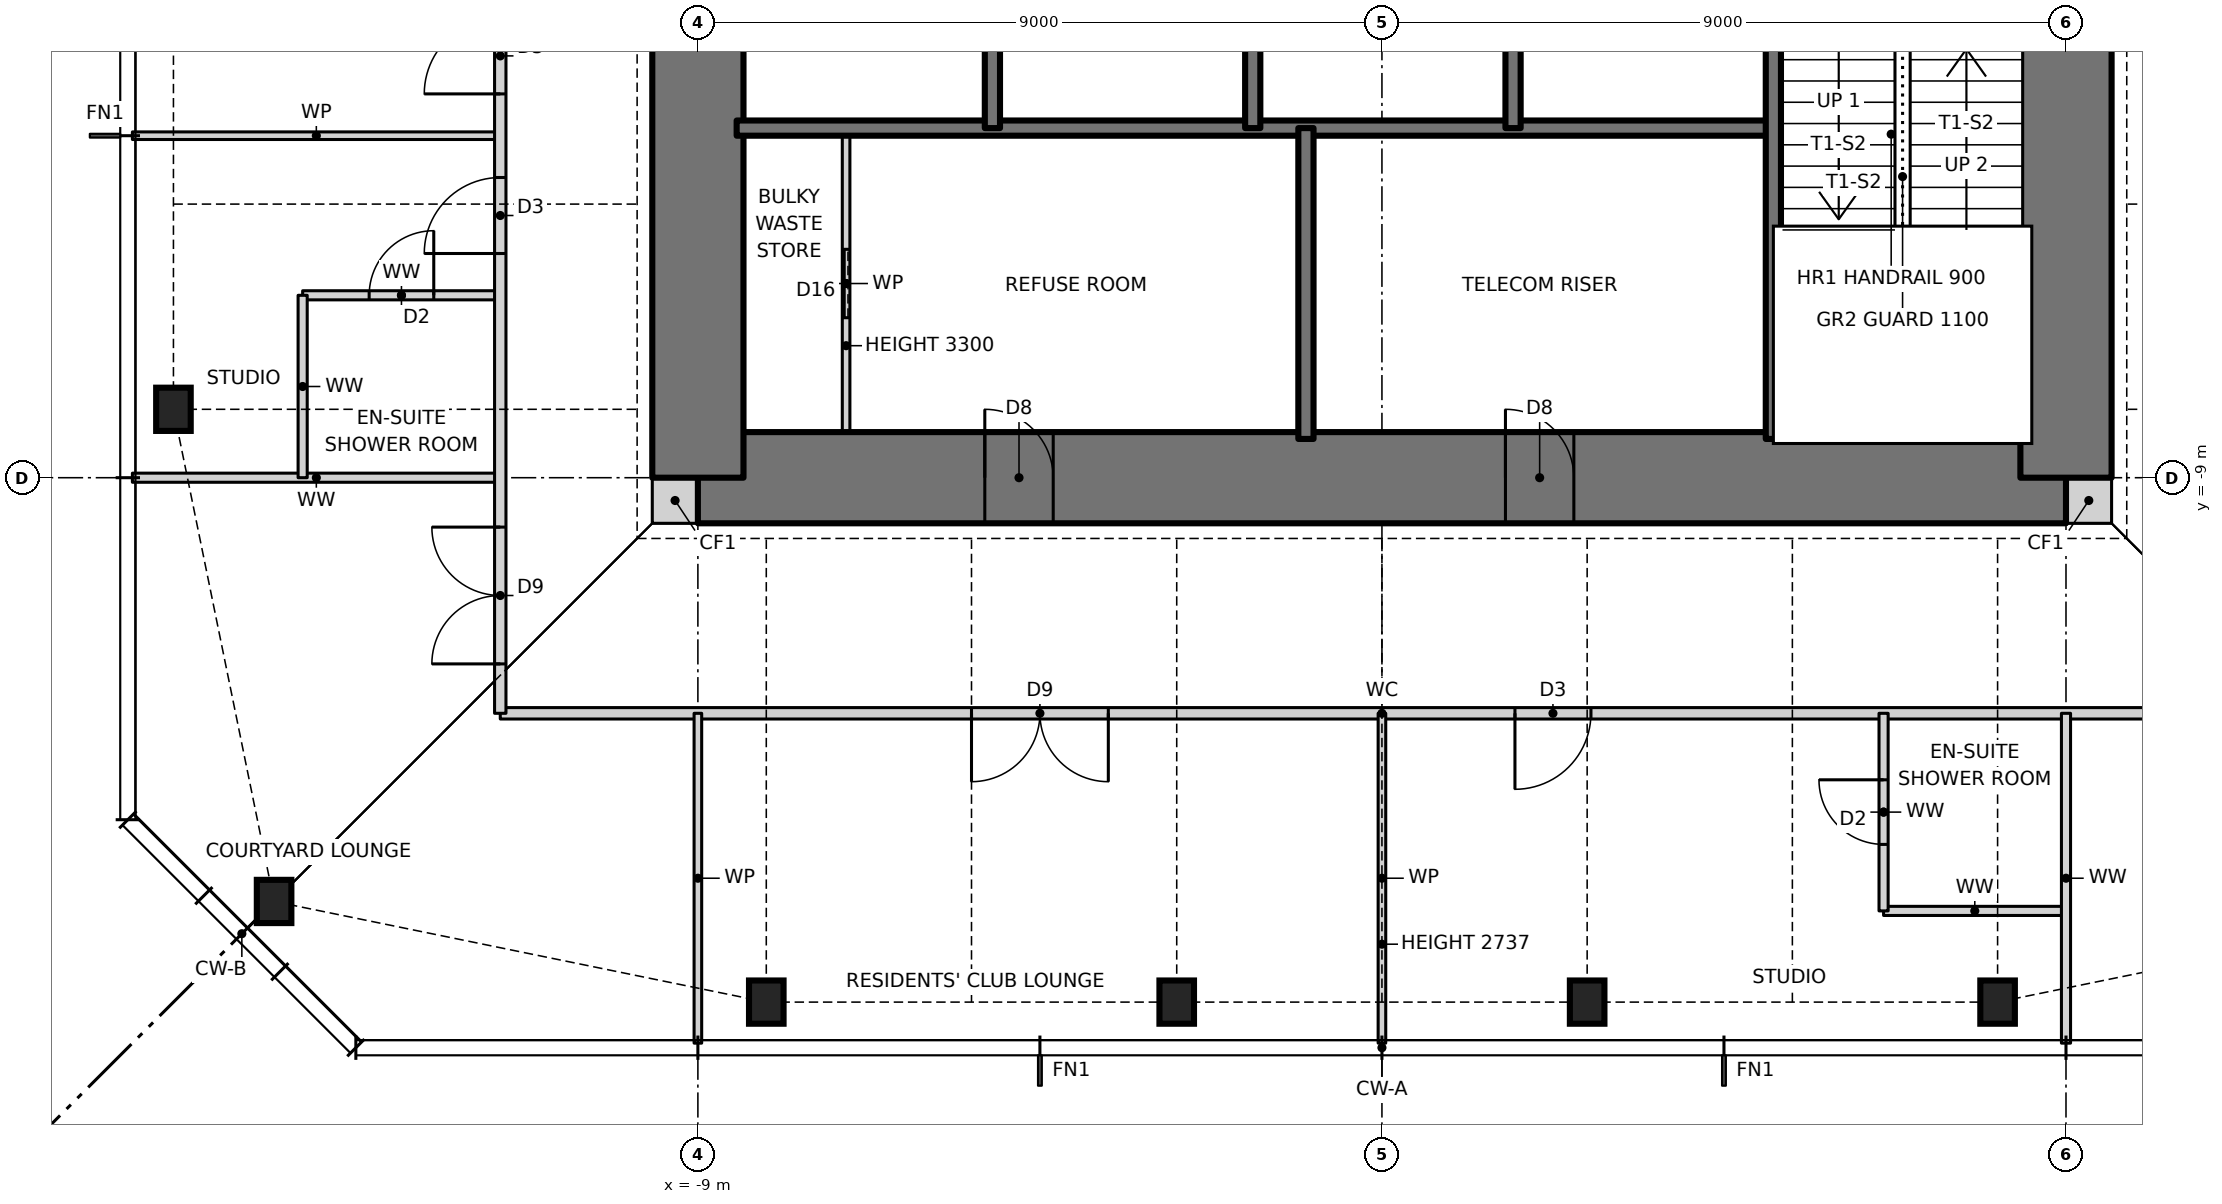
"""IFC4 building model, lengths in metres.
Left out: names, types, materials, properties, quantities, classifications, styles, units other than length and angle.
Written with IfcOpenShell. Run it as: python <this file> out.ifc"""

import sys

from ifc_helpers import new_model, si_unit, direction, frame, frame_2d, origin, origin_2d, place, context, subcontext, project, spatial, rectangle, i_section, extrude, element, fill, save


model = new_model("IFC4")
c1 = context("Model", 3, precision=1e-05, world=origin(), true_north=direction((0.0, 1.0)))
c2 = subcontext(c1, "Body", "Model", "MODEL_VIEW")
j1 = project(units=[si_unit("LENGTHUNIT", "METRE"), si_unit("PLANEANGLEUNIT", "RADIAN")], contexts=[c1])
p1 = place(None, origin())
s1 = spatial("IfcSite", under=j1, at=p1, CompositionType="ELEMENT")
p2 = place(p1, origin())
s2 = spatial("IfcBuilding", under=s1, at=p2, CompositionType="ELEMENT")
p3 = place(p2, frame((0.0, 0.0, 260.5)))
s3 = spatial("IfcBuildingStorey", under=s2, at=p3, CompositionType="ELEMENT", Elevation=260.5)
for number, where, z_axis, x_axis in (
    (1, (-14.576, -14.576, 0.0), (0.0, 0.0, 1.0), (1.0, 0.0, 0.0)),
    (2, (-8.1, -15.9, 0.0), (0.0, 0.0, 1.0), (1.0, 0.0, 0.0)),
    (3, (-2.7, -15.9, 0.0), (0.0, 0.0, 1.0), (1.0, 0.0, 0.0)),
    (4, (2.7, -15.9, 0.0), (0.0, 0.0, 1.0), (1.0, 0.0, 0.0)),
    (5, (8.1, -15.9, 0.0), (0.0, 0.0, 1.0), (1.0, 0.0, 0.0)),
    (6, (-15.9, -8.1, 0.0), (0.0, 0.0, 1.0), (1.0, 0.0, 0.0)),
):
    element("IfcColumn", number, at=place(p3, frame(where, z_axis=z_axis, x_axis=x_axis)), inside=s3, PredefinedType="COLUMN", context=c2, shape_type="SweptSolid", body=[
        extrude(i_section(OverallWidth=0.455, OverallDepth=0.569, WebThickness=0.078, FlangeThickness=0.125, at=origin_2d()), origin(), (0.0, 0.0, 1.0), 3.5),
    ])
for number, where, z_axis, x_axis in (
    (7, (-9.6, -9.3, 0.0), (0.0, 0.0, 1.0), (1.0, 0.0, 0.0)),
    (8, (9.0, -9.3, 0.0), (0.0, 0.0, 1.0), (1.0, 0.0, 0.0)),
):
    element("IfcWall", number, at=place(p3, frame(where, z_axis=z_axis, x_axis=x_axis)), inside=s3, PredefinedType="SOLIDWALL", context=c2, shape_type="SweptSolid", body=[
        extrude(rectangle(XDim=0.6, YDim=0.6, at=frame_2d((0.3, 0.0))), origin(), (0.0, 0.0, 1.0), 3.5),
    ])
p4 = place(p3, frame((-9.0, -9.0, 0.0), z_axis=(0.0, 0.0, 1.0), x_axis=(1.0, 0.0, 0.0)))
e9 = element("IfcWall", 9, at=p4, inside=s3, PredefinedType="SHEAR", context=c2, shape_type="SweptSolid", body=[
    extrude(rectangle(XDim=18.0, YDim=1.2, at=frame_2d((9.0, 0.0))), origin(), (0.0, 0.0, 1.0), 3.5),
])
p5 = place(p4, frame((3.775, 0.0, 0.0)))
e10 = element("IfcOpeningElement", 10, at=p5, cuts=e9, PredefinedType="OPENING", context=c2, shape_type="SweptSolid", body=[
    extrude(rectangle(XDim=0.9, YDim=2.1, at=frame_2d((0.45, 1.05))), frame((0.0, 0.61, 0.0), z_axis=(0.0, -1.0, 0.0), x_axis=(1.0, 0.0, 0.0)), (0.0, 0.0, 1.0), 1.22),
])
p6 = place(p4, frame((10.625, 0.0, 0.0)))
e11 = element("IfcOpeningElement", 11, at=p6, cuts=e9, PredefinedType="OPENING", context=c2, shape_type="SweptSolid", body=[
    extrude(rectangle(XDim=0.9, YDim=2.1, at=frame_2d((0.45, 1.05))), frame((0.0, 0.61, 0.0), z_axis=(0.0, -1.0, 0.0), x_axis=(1.0, 0.0, 0.0)), (0.0, 0.0, 1.0), 1.22),
])
p7 = place(p3, frame((9.0, -9.0, 0.0), z_axis=(0.0, 0.0, 1.0), x_axis=(0.0, 1.0, 0.0)))
e12 = element("IfcWall", 12, at=p7, inside=s3, PredefinedType="SHEAR", context=c2, shape_type="SweptSolid", body=[
    extrude(rectangle(XDim=18.0, YDim=1.2, at=frame_2d((9.0, 0.0))), origin(), (0.0, 0.0, 1.0), 3.5),
])
p8 = place(p7, frame((8.5, 0.0, 0.0)))
e13 = element("IfcOpeningElement", 13, at=p8, cuts=e12, PredefinedType="OPENING", context=c2, shape_type="SweptSolid", body=[
    extrude(rectangle(XDim=1.0, YDim=2.1, at=frame_2d((0.5, 1.05))), frame((0.0, 0.61, 0.0), z_axis=(0.0, -1.0, 0.0), x_axis=(1.0, 0.0, 0.0)), (0.0, 0.0, 1.0), 1.22),
])
p9 = place(p3, frame((-9.0, 9.0, 0.0), z_axis=(0.0, 0.0, 1.0), x_axis=(0.0, -1.0, 0.0)))
e14 = element("IfcWall", 14, at=p9, inside=s3, PredefinedType="SHEAR", context=c2, shape_type="SweptSolid", body=[
    extrude(rectangle(XDim=18.0, YDim=1.2, at=frame_2d((9.0, 0.0))), origin(), (0.0, 0.0, 1.0), 3.5),
])
p10 = place(p9, frame((8.5, 0.0, 0.0)))
e15 = element("IfcOpeningElement", 15, at=p10, cuts=e14, PredefinedType="OPENING", context=c2, shape_type="SweptSolid", body=[
    extrude(rectangle(XDim=1.0, YDim=2.1, at=frame_2d((0.5, 1.05))), frame((0.0, 0.61, 0.0), z_axis=(0.0, -1.0, 0.0), x_axis=(1.0, 0.0, 0.0)), (0.0, 0.0, 1.0), 1.22),
])
p11 = place(p3, frame((6.6, -14.7, 0.0), z_axis=(0.0, 0.0, 1.0), x_axis=(1.0, 0.0, 0.0)))
e16 = element("IfcWall", 16, at=p11, inside=s3, PredefinedType="PARTITIONING", context=c2, shape_type="SweptSolid", body=[
    extrude(rectangle(XDim=2.4, YDim=0.12, at=frame_2d((1.2, 0.0))), origin(), (0.0, 0.0, 1.0), 3.27),
])
p12 = place(p3, frame((-11.6, -12.1, 0.0), z_axis=(0.0, 0.0, 1.0), x_axis=(1.0, 0.0, 0.0)))
e17 = element("IfcWall", 17, at=p12, inside=s3, PredefinedType="PARTITIONING", context=c2, shape_type="SweptSolid", body=[
    extrude(rectangle(XDim=23.2, YDim=0.15, at=frame_2d((11.6, 0.0))), origin(), (0.0, 0.0, 1.0), 3.27),
])
p13 = place(p12, frame((6.2, 0.0, 0.0)))
e18 = element("IfcOpeningElement", 18, at=p13, cuts=e17, PredefinedType="OPENING", context=c2, shape_type="SweptSolid", body=[
    extrude(rectangle(XDim=1.8, YDim=2.1, at=frame_2d((0.9, 1.05))), frame((0.0, 0.085, 0.0), z_axis=(0.0, -1.0, 0.0), x_axis=(1.0, 0.0, 0.0)), (0.0, 0.0, 1.0), 0.17),
])
p14 = place(p12, frame((13.35, 0.0, 0.0)))
e19 = element("IfcOpeningElement", 19, at=p14, cuts=e17, PredefinedType="OPENING", context=c2, shape_type="SweptSolid", body=[
    extrude(rectangle(XDim=1.0, YDim=2.1, at=frame_2d((0.5, 1.05))), frame((0.0, 0.085, 0.0), z_axis=(0.0, -1.0, 0.0), x_axis=(1.0, 0.0, 0.0)), (0.0, 0.0, 1.0), 0.17),
])
p15 = place(p3, frame((-16.44, -9.0, 0.0), z_axis=(0.0, 0.0, 1.0), x_axis=(1.0, 0.0, 0.0)))
e20 = element("IfcWall", 20, at=p15, inside=s3, PredefinedType="PARTITIONING", context=c2, shape_type="SweptSolid", body=[
    extrude(rectangle(XDim=4.84, YDim=0.12, at=frame_2d((2.42, 0.0))), origin(), (0.0, 0.0, 1.0), 3.27),
])
p16 = place(p3, frame((-14.2, -6.6, 0.0), z_axis=(0.0, 0.0, 1.0), x_axis=(1.0, 0.0, 0.0)))
e21 = element("IfcWall", 21, at=p16, inside=s3, PredefinedType="PARTITIONING", context=c2, shape_type="SweptSolid", body=[
    extrude(rectangle(XDim=2.6, YDim=0.12, at=frame_2d((1.3, 0.0))), origin(), (0.0, 0.0, 1.0), 3.27),
])
p17 = place(p16, frame((0.875, 0.0, 0.0)))
e22 = element("IfcOpeningElement", 22, at=p17, cuts=e21, PredefinedType="OPENING", context=c2, shape_type="SweptSolid", body=[
    extrude(rectangle(XDim=0.85, YDim=2.1, at=frame_2d((0.425, 1.05))), frame((0.0, 0.07, 0.0), z_axis=(0.0, -1.0, 0.0), x_axis=(1.0, 0.0, 0.0)), (0.0, 0.0, 1.0), 0.14),
])
p18 = place(p3, frame((-16.44, -4.5, 0.0), z_axis=(0.0, 0.0, 1.0), x_axis=(1.0, 0.0, 0.0)))
e23 = element("IfcWall", 23, at=p18, inside=s3, PredefinedType="PARTITIONING", context=c2, shape_type="SweptSolid", body=[
    extrude(rectangle(XDim=4.84, YDim=0.1, at=frame_2d((2.42, 0.0))), origin(), (0.0, 0.0, 1.0), 3.27),
])
p19 = place(p3, frame((-8.49, -4.4, 0.0), z_axis=(0.0, 0.0, 1.0), x_axis=(1.0, 0.0, 0.0)))
e24 = element("IfcWall", 24, at=p19, inside=s3, PredefinedType="SOLIDWALL", context=c2, shape_type="SweptSolid", body=[
    extrude(rectangle(XDim=13.64, YDim=0.2, at=frame_2d((6.82, 0.0))), origin(), (0.0, 0.0, 1.0), 3.5),
])
p20 = place(p3, frame((9.0, -16.44, 0.0), z_axis=(0.0, 0.0, 1.0), x_axis=(0.0, 1.0, 0.0)))
e25 = element("IfcWall", 25, at=p20, inside=s3, PredefinedType="PARTITIONING", context=c2, shape_type="SweptSolid", body=[
    extrude(rectangle(XDim=4.34, YDim=0.12, at=frame_2d((2.17, 0.0))), origin(), (0.0, 0.0, 1.0), 3.27),
])
p21 = place(p3, frame((6.6, -14.7, 0.0), z_axis=(0.0, 0.0, 1.0), x_axis=(0.0, 1.0, 0.0)))
e26 = element("IfcWall", 26, at=p21, inside=s3, PredefinedType="PARTITIONING", context=c2, shape_type="SweptSolid", body=[
    extrude(rectangle(XDim=2.6, YDim=0.12, at=frame_2d((1.3, 0.0))), origin(), (0.0, 0.0, 1.0), 3.27),
])
p22 = place(p21, frame((0.875, 0.0, 0.0)))
e27 = element("IfcOpeningElement", 27, at=p22, cuts=e26, PredefinedType="OPENING", context=c2, shape_type="SweptSolid", body=[
    extrude(rectangle(XDim=0.85, YDim=2.1, at=frame_2d((0.425, 1.05))), frame((0.0, 0.07, 0.0), z_axis=(0.0, -1.0, 0.0), x_axis=(1.0, 0.0, 0.0)), (0.0, 0.0, 1.0), 0.14),
])
p23 = place(p3, frame((5.15, -8.49, 0.0), z_axis=(0.0, 0.0, 1.0), x_axis=(0.0, 1.0, 0.0)))
e28 = element("IfcWall", 28, at=p23, inside=s3, PredefinedType="SOLIDWALL", context=c2, shape_type="SweptSolid", body=[
    extrude(rectangle(XDim=13.09, YDim=0.2, at=frame_2d((6.545, 0.0))), origin(), (0.0, 0.0, 1.0), 3.5),
])
p24 = place(p23, frame((7.89, 0.0, 0.0)))
e29 = element("IfcOpeningElement", 29, at=p24, cuts=e28, PredefinedType="OPENING", context=c2, shape_type="SweptSolid", body=[
    extrude(rectangle(XDim=1.2, YDim=2.1, at=frame_2d((0.6, 1.05))), frame((0.0, 0.11, 0.0), z_axis=(0.0, -1.0, 0.0), x_axis=(1.0, 0.0, 0.0)), (0.0, 0.0, 1.0), 0.22),
])
p25 = place(p3, frame((1.725, -4.4, 0.0), z_axis=(0.0, 0.0, 1.0), x_axis=(0.0, 1.0, 0.0)))
e30 = element("IfcWall", 30, at=p25, inside=s3, PredefinedType="SOLIDWALL", context=c2, shape_type="SweptSolid", body=[
    extrude(rectangle(XDim=2.8, YDim=0.2, at=frame_2d((1.4, 0.0))), origin(), (0.0, 0.0, 1.0), 3.5),
])
p26 = place(p3, frame((0.0, -16.44, 0.0), z_axis=(0.0, 0.0, 1.0), x_axis=(0.0, 1.0, 0.0)))
e31 = element("IfcWall", 31, at=p26, inside=s3, PredefinedType="PARTITIONING", context=c2, shape_type="SweptSolid", body=[
    extrude(rectangle(XDim=4.34, YDim=0.1, at=frame_2d((2.17, 0.0))), origin(), (0.0, 0.0, 1.0), 2.737),
])
p27 = place(p3, frame((-1.0, -8.49, 0.0), z_axis=(0.0, 0.0, 1.0), x_axis=(0.0, 1.0, 0.0)))
e32 = element("IfcWall", 32, at=p27, inside=s3, PredefinedType="SOLIDWALL", context=c2, shape_type="SweptSolid", body=[
    extrude(rectangle(XDim=4.09, YDim=0.2, at=frame_2d((2.045, 0.0))), origin(), (0.0, 0.0, 1.0), 3.5),
])
for number, where, z_axis, x_axis in (
    (33, (-1.7, -4.4, 0.0), (0.0, 0.0, 1.0), (0.0, 1.0, 0.0)),
    (34, (-5.125, -4.4, 0.0), (0.0, 0.0, 1.0), (0.0, 1.0, 0.0)),
):
    element("IfcWall", number, at=place(p3, frame(where, z_axis=z_axis, x_axis=x_axis)), inside=s3, PredefinedType="SOLIDWALL", context=c2, shape_type="SweptSolid", body=[
        extrude(rectangle(XDim=2.8, YDim=0.2, at=frame_2d((1.4, 0.0))), origin(), (0.0, 0.0, 1.0), 3.5),
    ])
p28 = place(p3, frame((-7.05, -8.49, 0.0), z_axis=(0.0, 0.0, 1.0), x_axis=(0.0, 1.0, 0.0)))
e35 = element("IfcWall", 35, at=p28, inside=s3, PredefinedType="PARTITIONING", context=c2, shape_type="SweptSolid", body=[
    extrude(rectangle(XDim=4.09, YDim=0.1, at=frame_2d((2.045, 0.0))), origin(), (0.0, 0.0, 1.0), 3.3),
])
p29 = place(p28, frame((1.595, 0.0, 0.0)))
e36 = element("IfcOpeningElement", 36, at=p29, cuts=e35, PredefinedType="OPENING", context=c2, shape_type="SweptSolid", body=[
    extrude(rectangle(XDim=0.9, YDim=2.1, at=frame_2d((0.45, 1.05))), frame((0.0, 0.06, 0.0), z_axis=(0.0, -1.0, 0.0), x_axis=(1.0, 0.0, 0.0)), (0.0, 0.0, 1.0), 0.12),
])
p30 = place(p3, frame((-9.0, -16.44, 0.0), z_axis=(0.0, 0.0, 1.0), x_axis=(0.0, 1.0, 0.0)))
e37 = element("IfcWall", 37, at=p30, inside=s3, PredefinedType="PARTITIONING", context=c2, shape_type="SweptSolid", body=[
    extrude(rectangle(XDim=4.34, YDim=0.1, at=frame_2d((2.17, 0.0))), origin(), (0.0, 0.0, 1.0), 3.27),
])
p31 = place(p3, frame((-11.6, -12.1, 0.0), z_axis=(0.0, 0.0, 1.0), x_axis=(0.0, 1.0, 0.0)))
e38 = element("IfcWall", 38, at=p31, inside=s3, PredefinedType="PARTITIONING", context=c2, shape_type="SweptSolid", body=[
    extrude(rectangle(XDim=23.7, YDim=0.15, at=frame_2d((11.85, 0.0))), origin(), (0.0, 0.0, 1.0), 3.27),
])
p32 = place(p31, frame((17.15, 0.0, 0.0)))
e39 = element("IfcOpeningElement", 39, at=p32, cuts=e38, PredefinedType="OPENING", context=c2, shape_type="SweptSolid", body=[
    extrude(rectangle(XDim=1.0, YDim=2.1, at=frame_2d((0.5, 1.05))), frame((0.0, 0.085, 0.0), z_axis=(0.0, -1.0, 0.0), x_axis=(1.0, 0.0, 0.0)), (0.0, 0.0, 1.0), 0.17),
])
p33 = place(p31, frame((13.45, 0.0, 0.0)))
e40 = element("IfcOpeningElement", 40, at=p33, cuts=e38, PredefinedType="OPENING", context=c2, shape_type="SweptSolid", body=[
    extrude(rectangle(XDim=1.8, YDim=2.1, at=frame_2d((0.9, 1.05))), frame((0.0, 0.085, 0.0), z_axis=(0.0, -1.0, 0.0), x_axis=(1.0, 0.0, 0.0)), (0.0, 0.0, 1.0), 0.17),
])
p34 = place(p31, frame((8.15, 0.0, 0.0)))
e41 = element("IfcOpeningElement", 41, at=p34, cuts=e38, PredefinedType="OPENING", context=c2, shape_type="SweptSolid", body=[
    extrude(rectangle(XDim=1.0, YDim=2.1, at=frame_2d((0.5, 1.05))), frame((0.0, 0.085, 0.0), z_axis=(0.0, -1.0, 0.0), x_axis=(1.0, 0.0, 0.0)), (0.0, 0.0, 1.0), 0.17),
])
p35 = place(p31, frame((6.05, 0.0, 0.0)))
e42 = element("IfcOpeningElement", 42, at=p35, cuts=e38, PredefinedType="OPENING", context=c2, shape_type="SweptSolid", body=[
    extrude(rectangle(XDim=1.0, YDim=2.1, at=frame_2d((0.5, 1.05))), frame((0.0, 0.085, 0.0), z_axis=(0.0, -1.0, 0.0), x_axis=(1.0, 0.0, 0.0)), (0.0, 0.0, 1.0), 0.17),
])
p36 = place(p31, frame((0.65, 0.0, 0.0)))
e43 = element("IfcOpeningElement", 43, at=p36, cuts=e38, PredefinedType="OPENING", context=c2, shape_type="SweptSolid", body=[
    extrude(rectangle(XDim=1.8, YDim=2.1, at=frame_2d((0.9, 1.05))), frame((0.0, 0.085, 0.0), z_axis=(0.0, -1.0, 0.0), x_axis=(1.0, 0.0, 0.0)), (0.0, 0.0, 1.0), 0.17),
])
p37 = place(p3, frame((-14.2, -9.0, 0.0), z_axis=(0.0, 0.0, 1.0), x_axis=(0.0, 1.0, 0.0)))
e44 = element("IfcWall", 44, at=p37, inside=s3, PredefinedType="PARTITIONING", context=c2, shape_type="SweptSolid", body=[
    extrude(rectangle(XDim=2.4, YDim=0.12, at=frame_2d((1.2, 0.0))), origin(), (0.0, 0.0, 1.0), 3.27),
])
p38 = place(p29, origin())
e45 = element("IfcDoor", 45, at=p38, inside=s3, OperationType="SLIDING_TO_LEFT", PredefinedType="DOOR", context=c2, shape_type="SweptSolid", body=[
    extrude(rectangle(XDim=0.9, YDim=2.1, at=frame_2d((0.45, 1.05))), frame((0.0, 0.025, 0.0), z_axis=(0.0, -1.0, 0.0), x_axis=(1.0, 0.0, 0.0)), (0.0, 0.0, 1.0), 0.05),
])
fill(e36, e45)
p39 = place(p13, frame((1.8, 0.0, 0.0), z_axis=(0.0, 0.0, 1.0), x_axis=(-1.0, 0.0, 0.0)))
e46 = element("IfcDoor", 46, at=p39, inside=s3, OperationType="DOUBLE_DOOR_SINGLE_SWING", PredefinedType="DOOR", context=c2, shape_type="SweptSolid", body=[
    extrude(rectangle(XDim=1.8, YDim=2.1, at=frame_2d((0.9, 1.05))), frame((0.0, 0.025, 0.0), z_axis=(0.0, -1.0, 0.0), x_axis=(1.0, 0.0, 0.0)), (0.0, 0.0, 1.0), 0.05),
])
fill(e18, e46)
p40 = place(p14, frame((1.0, 0.0, 0.0), z_axis=(0.0, 0.0, 1.0), x_axis=(-1.0, 0.0, 0.0)))
e47 = element("IfcDoor", 47, at=p40, inside=s3, OperationType="SINGLE_SWING_RIGHT", PredefinedType="DOOR", context=c2, shape_type="SweptSolid", body=[
    extrude(rectangle(XDim=1.0, YDim=2.1, at=frame_2d((0.5, 1.05))), frame((0.0, 0.025, 0.0), z_axis=(0.0, -1.0, 0.0), x_axis=(1.0, 0.0, 0.0)), (0.0, 0.0, 1.0), 0.05),
])
fill(e19, e47)
p41 = place(p22, origin())
e48 = element("IfcDoor", 48, at=p41, inside=s3, OperationType="SINGLE_SWING_RIGHT", PredefinedType="DOOR", context=c2, shape_type="SweptSolid", body=[
    extrude(rectangle(XDim=0.85, YDim=2.1, at=frame_2d((0.425, 1.05))), frame((0.0, 0.025, 0.0), z_axis=(0.0, -1.0, 0.0), x_axis=(1.0, 0.0, 0.0)), (0.0, 0.0, 1.0), 0.05),
])
fill(e27, e48)
p42 = place(p34, origin())
e49 = element("IfcDoor", 49, at=p42, inside=s3, OperationType="SINGLE_SWING_LEFT", PredefinedType="DOOR", context=c2, shape_type="SweptSolid", body=[
    extrude(rectangle(XDim=1.0, YDim=2.1, at=frame_2d((0.5, 1.05))), frame((0.0, 0.025, 0.0), z_axis=(0.0, -1.0, 0.0), x_axis=(1.0, 0.0, 0.0)), (0.0, 0.0, 1.0), 0.05),
])
fill(e41, e49)
p43 = place(p35, origin())
e50 = element("IfcDoor", 50, at=p43, inside=s3, OperationType="SINGLE_SWING_LEFT", PredefinedType="DOOR", context=c2, shape_type="SweptSolid", body=[
    extrude(rectangle(XDim=1.0, YDim=2.1, at=frame_2d((0.5, 1.05))), frame((0.0, 0.025, 0.0), z_axis=(0.0, -1.0, 0.0), x_axis=(1.0, 0.0, 0.0)), (0.0, 0.0, 1.0), 0.05),
])
fill(e42, e50)
p44 = place(p17, origin())
e51 = element("IfcDoor", 51, at=p44, inside=s3, OperationType="SINGLE_SWING_RIGHT", PredefinedType="DOOR", context=c2, shape_type="SweptSolid", body=[
    extrude(rectangle(XDim=0.85, YDim=2.1, at=frame_2d((0.425, 1.05))), frame((0.0, 0.025, 0.0), z_axis=(0.0, -1.0, 0.0), x_axis=(1.0, 0.0, 0.0)), (0.0, 0.0, 1.0), 0.05),
])
fill(e22, e51)
p45 = place(p36, origin())
e52 = element("IfcDoor", 52, at=p45, inside=s3, OperationType="DOUBLE_DOOR_SINGLE_SWING", PredefinedType="DOOR", context=c2, shape_type="SweptSolid", body=[
    extrude(rectangle(XDim=1.8, YDim=2.1, at=frame_2d((0.9, 1.05))), frame((0.0, 0.025, 0.0), z_axis=(0.0, -1.0, 0.0), x_axis=(1.0, 0.0, 0.0)), (0.0, 0.0, 1.0), 0.05),
])
fill(e43, e52)
p46 = place(p5, origin())
e53 = element("IfcDoor", 53, at=p46, inside=s3, OperationType="SINGLE_SWING_LEFT", PredefinedType="DOOR", context=c2, shape_type="SweptSolid", body=[
    extrude(rectangle(XDim=0.9, YDim=2.1, at=frame_2d((0.45, 1.05))), frame((0.0, 0.025, 0.0), z_axis=(0.0, -1.0, 0.0), x_axis=(1.0, 0.0, 0.0)), (0.0, 0.0, 1.0), 0.05),
])
fill(e10, e53)
p47 = place(p6, origin())
e54 = element("IfcDoor", 54, at=p47, inside=s3, OperationType="SINGLE_SWING_LEFT", PredefinedType="DOOR", context=c2, shape_type="SweptSolid", body=[
    extrude(rectangle(XDim=0.9, YDim=2.1, at=frame_2d((0.45, 1.05))), frame((0.0, 0.025, 0.0), z_axis=(0.0, -1.0, 0.0), x_axis=(1.0, 0.0, 0.0)), (0.0, 0.0, 1.0), 0.05),
])
fill(e11, e54)
save(model, sys.argv[1])
